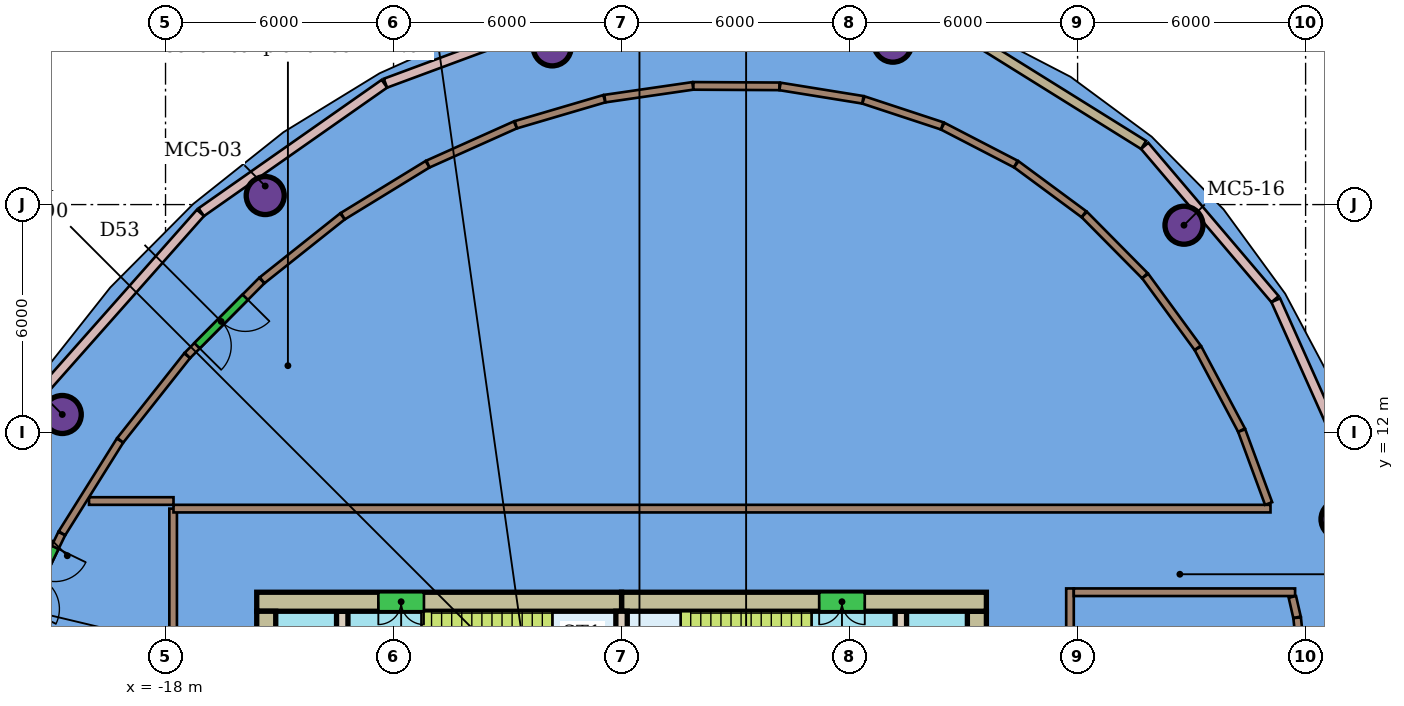
"""IFC4 building model, lengths in metres.
Left out: names, types, materials, properties, quantities, classifications, styles, units other than length and angle.
Written with IfcOpenShell. Run it as: python <this file> out.ifc"""

import sys

from ifc_helpers import new_model, si_unit, direction, frame, frame_2d, origin, origin_2d, place, context, subcontext, project, spatial, rectangle, hollow_circle, extrude, element, fill, save


model = new_model("IFC4")
c1 = context("Model", 3, precision=1e-05, world=origin(), true_north=direction((0.0, 1.0)))
c2 = subcontext(c1, "Body", "Model", "MODEL_VIEW")
j1 = project(units=[si_unit("LENGTHUNIT", "METRE"), si_unit("PLANEANGLEUNIT", "RADIAN")], contexts=[c1])
p1 = place(None, origin())
s1 = spatial("IfcSite", under=j1, at=p1, CompositionType="ELEMENT")
p2 = place(p1, origin())
s2 = spatial("IfcBuilding", under=s1, at=p2, CompositionType="ELEMENT")
p3 = place(p2, frame((0.0, 0.0, 308.7)))
s3 = spatial("IfcBuildingStorey", under=s2, at=p3, CompositionType="ELEMENT", Elevation=308.7)
for number, where, z_axis, x_axis in (
    (1, (1.138, 22.247, 0.0), (0.0, 0.0, 1.0), (1.0, 0.0, 0.0)),
    (2, (-7.825, 22.149, 0.0), (0.0, 0.0, 1.0), (1.0, 0.0, 0.0)),
    (3, (-15.377, 18.238, 0.0), (0.0, 0.0, 1.0), (1.0, 0.0, 0.0)),
    (4, (-20.718, 12.477, 0.0), (0.0, 0.0, 1.0), (1.0, 0.0, 0.0)),
    (5, (12.906, 9.72, 0.0), (0.0, 0.0, 1.0), (1.0, 0.0, 0.0)),
    (6, (8.8, 17.457, 0.0), (0.0, 0.0, 1.0), (1.0, 0.0, 0.0)),
):
    element("IfcColumn", number, at=place(p3, frame(where, z_axis=z_axis, x_axis=x_axis)), inside=s3, PredefinedType="COLUMN", context=c2, shape_type="SweptSolid", body=[
        extrude(hollow_circle(Radius=0.5, WallThickness=0.04, at=origin_2d()), origin(), (0.0, 0.0, 1.0), 4.0),
    ])
p4 = place(p3, frame((-17.8, -7.9, 0.0), z_axis=(0.0, 0.0, 1.0), x_axis=(0.0, 1.0, 0.0)))
e7 = element("IfcWall", 7, at=p4, inside=s3, PredefinedType="PARTITIONING", context=c2, shape_type="SweptSolid", body=[
    extrude(rectangle(XDim=17.9, YDim=0.2, at=frame_2d((8.95, 0.0))), origin(), (0.0, 0.0, 1.0), 3.65),
])
p5 = place(p3, frame((-17.79, 10.0, 0.0), z_axis=(0.0, 0.0, 1.0), x_axis=(1.0, 0.0, 0.0)))
e8 = element("IfcWall", 8, at=p5, inside=s3, PredefinedType="PARTITIONING", context=c2, shape_type="SweptSolid", body=[
    extrude(rectangle(XDim=28.866, YDim=0.2, at=frame_2d((14.433, 0.0))), origin(), (0.0, 0.0, 1.0), 3.65),
])
p6 = place(p3, frame((5.8, -9.9, 0.0), z_axis=(0.0, 0.0, 1.0), x_axis=(0.0, 1.0, 0.0)))
e9 = element("IfcWall", 9, at=p6, inside=s3, PredefinedType="PARTITIONING", context=c2, shape_type="SweptSolid", body=[
    extrude(rectangle(XDim=17.8, YDim=0.2, at=frame_2d((8.9, 0.0))), origin(), (0.0, 0.0, 1.0), 3.65),
])
p7 = place(p6, frame((8.4, 0.0, 0.0)))
e10 = element("IfcOpeningElement", 10, at=p7, cuts=e9, PredefinedType="OPENING", context=c2, shape_type="SweptSolid", body=[
    extrude(rectangle(XDim=1.0, YDim=2.1, at=frame_2d((0.5, 1.05))), frame((0.0, 0.11, 0.0), z_axis=(0.0, -1.0, 0.0), x_axis=(1.0, 0.0, 0.0)), (0.0, 0.0, 1.0), 0.22),
])
p8 = place(p3, frame((5.9, 7.8, 0.0), z_axis=(0.0, 0.0, 1.0), x_axis=(1.0, 0.0, 0.0)))
e11 = element("IfcWall", 11, at=p8, inside=s3, PredefinedType="PARTITIONING", context=c2, shape_type="SweptSolid", body=[
    extrude(rectangle(XDim=5.824, YDim=0.2, at=frame_2d((2.912, 0.0))), origin(), (0.0, 0.0, 1.0), 3.65),
])
p9 = place(p3, frame((-20.013, 10.2, 0.0), z_axis=(0.0, 0.0, 1.0), x_axis=(1.0, 0.0, 0.0)))
e12 = element("IfcWall", 12, at=p9, inside=s3, PredefinedType="PARTITIONING", context=c2, shape_type="SweptSolid", body=[
    extrude(rectangle(XDim=2.223, YDim=0.2, at=frame_2d((1.112, 0.0))), origin(), (0.0, 0.0, 1.0), 3.65),
])
p10 = place(p3, frame((-20.73, 9.343, 0.0), z_axis=(0.0, 0.0, 1.0), x_axis=(-0.436405284506, -0.89975020292, 0.0)))
e13 = element("IfcWall", 13, at=p10, inside=s3, PredefinedType="PARTITIONING", context=c2, shape_type="SweptSolid", body=[
    extrude(rectangle(XDim=2.909, YDim=0.2, at=frame_2d((1.455, 0.0))), origin(), (0.0, 0.0, 1.0), 3.65),
])
p11 = place(p10, frame((0.403, 0.0, 0.0)))
e14 = element("IfcOpeningElement", 14, at=p11, cuts=e13, PredefinedType="OPENING", context=c2, shape_type="SweptSolid", body=[
    extrude(rectangle(XDim=1.8, YDim=2.4, at=frame_2d((0.9, 1.2))), frame((0.0, 0.11, 0.0), z_axis=(0.0, -1.0, 0.0), x_axis=(1.0, 0.0, 0.0)), (0.0, 0.0, 1.0), 0.22),
])
p12 = place(p3, frame((-20.725, 9.352, 0.0), z_axis=(0.0, 0.0, 1.0), x_axis=(0.530761457751, 0.847521253401, 0.0)))
e15 = element("IfcWall", 15, at=p12, inside=s3, PredefinedType="PARTITIONING", context=c2, shape_type="SweptSolid", body=[
    extrude(rectangle(XDim=2.877, YDim=0.2, at=frame_2d((1.438, 0.0))), origin(), (0.0, 0.0, 1.0), 3.65),
])
p13 = place(p3, frame((-19.191, 11.799, 0.0), z_axis=(0.0, 0.0, 1.0), x_axis=(0.620327979869, 0.784342525553, 0.0)))
e16 = element("IfcWall", 16, at=p13, inside=s3, PredefinedType="PARTITIONING", context=c2, shape_type="SweptSolid", body=[
    extrude(rectangle(XDim=2.836, YDim=0.2, at=frame_2d((1.418, 0.0))), origin(), (0.0, 0.0, 1.0), 3.65),
])
p14 = place(p3, frame((-15.468, 16.001, 0.0), z_axis=(0.0, 0.0, 1.0), x_axis=(-0.704683921548, -0.70952136734, 0.0)))
e17 = element("IfcWall", 17, at=p14, inside=s3, PredefinedType="PARTITIONING", context=c2, shape_type="SweptSolid", body=[
    extrude(rectangle(XDim=2.776, YDim=0.2, at=frame_2d((1.388, 0.0))), origin(), (0.0, 0.0, 1.0), 3.65),
])
p15 = place(p14, frame((0.617, 0.0, 0.0)))
e18 = element("IfcOpeningElement", 18, at=p15, cuts=e17, PredefinedType="OPENING", context=c2, shape_type="SweptSolid", body=[
    extrude(rectangle(XDim=1.8, YDim=2.4, at=frame_2d((0.9, 1.2))), frame((0.0, 0.11, 0.0), z_axis=(0.0, -1.0, 0.0), x_axis=(1.0, 0.0, 0.0)), (0.0, 0.0, 1.0), 0.22),
])
p16 = place(p3, frame((-15.458, 16.008, 0.0), z_axis=(0.0, 0.0, 1.0), x_axis=(0.782656107767, 0.62245434931, 0.0)))
e19 = element("IfcWall", 19, at=p16, inside=s3, PredefinedType="PARTITIONING", context=c2, shape_type="SweptSolid", body=[
    extrude(rectangle(XDim=2.7, YDim=0.2, at=frame_2d((1.35, 0.0))), origin(), (0.0, 0.0, 1.0), 3.65),
])
p17 = place(p3, frame((-13.334, 17.696, 0.0), z_axis=(0.0, 0.0, 1.0), x_axis=(0.852667029926, 0.522454721557, 0.0)))
e20 = element("IfcWall", 20, at=p17, inside=s3, PredefinedType="PARTITIONING", context=c2, shape_type="SweptSolid", body=[
    extrude(rectangle(XDim=2.614, YDim=0.2, at=frame_2d((1.307, 0.0))), origin(), (0.0, 0.0, 1.0), 3.65),
])
p18 = place(p3, frame((-11.094, 19.067, 0.0), z_axis=(0.0, 0.0, 1.0), x_axis=(0.912552955942, 0.408958558538, 0.0)))
e21 = element("IfcWall", 21, at=p18, inside=s3, PredefinedType="PARTITIONING", context=c2, shape_type="SweptSolid", body=[
    extrude(rectangle(XDim=2.521, YDim=0.2, at=frame_2d((1.26, 0.0))), origin(), (0.0, 0.0, 1.0), 3.65),
])
p19 = place(p3, frame((-8.781, 20.101, 0.0), z_axis=(0.0, 0.0, 1.0), x_axis=(0.95934146389, 0.28224803925, 0.0)))
e22 = element("IfcWall", 22, at=p19, inside=s3, PredefinedType="PARTITIONING", context=c2, shape_type="SweptSolid", body=[
    extrude(rectangle(XDim=2.426, YDim=0.2, at=frame_2d((1.213, 0.0))), origin(), (0.0, 0.0, 1.0), 3.65),
])
p20 = place(p3, frame((-6.439, 20.788, 0.0), z_axis=(0.0, 0.0, 1.0), x_axis=(0.989671979467, 0.143350525141, 0.0)))
e23 = element("IfcWall", 23, at=p20, inside=s3, PredefinedType="PARTITIONING", context=c2, shape_type="SweptSolid", body=[
    extrude(rectangle(XDim=2.338, YDim=0.2, at=frame_2d((1.169, 0.0))), origin(), (0.0, 0.0, 1.0), 3.65),
])
p21 = place(p3, frame((-4.11, 21.123, 0.0), z_axis=(0.0, 0.0, 1.0), x_axis=(0.999986603133, -0.005176248997, 0.0)))
e24 = element("IfcWall", 24, at=p21, inside=s3, PredefinedType="PARTITIONING", context=c2, shape_type="SweptSolid", body=[
    extrude(rectangle(XDim=2.264, YDim=0.2, at=frame_2d((1.132, 0.0))), origin(), (0.0, 0.0, 1.0), 3.65),
])
p22 = place(p3, frame((-1.831, 21.109, 0.0), z_axis=(0.0, 0.0, 1.0), x_axis=(0.987257926423, -0.159128208423, 0.0)))
e25 = element("IfcWall", 25, at=p22, inside=s3, PredefinedType="PARTITIONING", context=c2, shape_type="SweptSolid", body=[
    extrude(rectangle(XDim=2.209, YDim=0.2, at=frame_2d((1.104, 0.0))), origin(), (0.0, 0.0, 1.0), 3.65),
])
p23 = place(p3, frame((0.365, 20.752, 0.0), z_axis=(0.0, 0.0, 1.0), x_axis=(0.949852302688, -0.312698901627, 0.0)))
e26 = element("IfcWall", 26, at=p23, inside=s3, PredefinedType="PARTITIONING", context=c2, shape_type="SweptSolid", body=[
    extrude(rectangle(XDim=2.181, YDim=0.2, at=frame_2d((1.09, 0.0))), origin(), (0.0, 0.0, 1.0), 3.65),
])
p24 = place(p3, frame((2.451, 20.063, 0.0), z_axis=(0.0, 0.0, 1.0), x_axis=(0.888068415533, -0.45971131086, 0.0)))
e27 = element("IfcWall", 27, at=p24, inside=s3, PredefinedType="PARTITIONING", context=c2, shape_type="SweptSolid", body=[
    extrude(rectangle(XDim=2.165, YDim=0.2, at=frame_2d((1.082, 0.0))), origin(), (0.0, 0.0, 1.0), 3.65),
])
p25 = place(p3, frame((4.387, 19.06, 0.0), z_axis=(0.0, 0.0, 1.0), x_axis=(0.80443326696, -0.594043027909, 0.0)))
e28 = element("IfcWall", 28, at=p25, inside=s3, PredefinedType="PARTITIONING", context=c2, shape_type="SweptSolid", body=[
    extrude(rectangle(XDim=2.209, YDim=0.2, at=frame_2d((1.105, 0.0))), origin(), (0.0, 0.0, 1.0), 3.65),
])
p26 = place(p3, frame((6.177, 17.739, 0.0), z_axis=(0.0, 0.0, 1.0), x_axis=(0.703376280453, -0.710817703843, 0.0)))
e29 = element("IfcWall", 29, at=p26, inside=s3, PredefinedType="PARTITIONING", context=c2, shape_type="SweptSolid", body=[
    extrude(rectangle(XDim=2.264, YDim=0.2, at=frame_2d((1.132, 0.0))), origin(), (0.0, 0.0, 1.0), 3.65),
])
p27 = place(p3, frame((7.78, 16.119, 0.0), z_axis=(0.0, 0.0, 1.0), x_axis=(0.590082027637, -0.807343297897, 0.0)))
e30 = element("IfcWall", 30, at=p27, inside=s3, PredefinedType="PARTITIONING", context=c2, shape_type="SweptSolid", body=[
    extrude(rectangle(XDim=2.338, YDim=0.2, at=frame_2d((1.169, 0.0))), origin(), (0.0, 0.0, 1.0), 3.65),
])
p28 = place(p3, frame((9.168, 14.219, 0.0), z_axis=(0.0, 0.0, 1.0), x_axis=(0.469606334902, -0.882875920059, 0.0)))
e31 = element("IfcWall", 31, at=p28, inside=s3, PredefinedType="PARTITIONING", context=c2, shape_type="SweptSolid", body=[
    extrude(rectangle(XDim=2.44, YDim=0.2, at=frame_2d((1.22, 0.0))), origin(), (0.0, 0.0, 1.0), 3.65),
])
p29 = place(p3, frame((10.319, 12.052, 0.0), z_axis=(0.0, 0.0, 1.0), x_axis=(0.346197844841, -0.938161527791, 0.0)))
e32 = element("IfcWall", 32, at=p29, inside=s3, PredefinedType="PARTITIONING", context=c2, shape_type="SweptSolid", body=[
    extrude(rectangle(XDim=2.044, YDim=0.2, at=frame_2d((1.022, 0.0))), origin(), (0.0, 0.0, 1.0), 3.65),
])
p30 = place(p3, frame((11.652, 7.678, 0.0), z_axis=(0.0, 0.0, 1.0), x_axis=(0.2234024776, -0.974726286196, 0.0)))
e33 = element("IfcWall", 33, at=p30, inside=s3, PredefinedType="PARTITIONING", context=c2, shape_type="SweptSolid", body=[
    extrude(rectangle(XDim=0.551, YDim=0.2, at=frame_2d((0.275, 0.0))), origin(), (0.0, 0.0, 1.0), 3.65),
])
p31 = place(p3, frame((11.777, 7.129, 0.0), z_axis=(0.0, 0.0, 1.0), x_axis=(0.102877560919, -0.994694027055, 0.0)))
e34 = element("IfcWall", 34, at=p31, inside=s3, PredefinedType="PARTITIONING", context=c2, shape_type="SweptSolid", body=[
    extrude(rectangle(XDim=2.701, YDim=0.2, at=frame_2d((1.35, 0.0))), origin(), (0.0, 0.0, 1.0), 3.65),
])
p32 = place(p3, frame((-6.983, 23.131, 0.0), z_axis=(0.0, 0.0, 1.0), x_axis=(-0.937764073403, -0.34727300879, 0.0)))
e35 = element("IfcWall", 35, at=p32, inside=s3, PredefinedType="SOLIDWALL", context=c2, shape_type="SweptSolid", body=[
    extrude(rectangle(XDim=5.577, YDim=0.25, at=frame_2d((2.789, 0.0))), origin(), (0.0, 0.0, 1.0), 3.7),
])
p33 = place(p3, frame((-12.241, 21.18, 0.0), z_axis=(0.0, 0.0, 1.0), x_axis=(-0.818761962214, -0.574133128492, 0.0)))
e36 = element("IfcWall", 36, at=p33, inside=s3, PredefinedType="SOLIDWALL", context=c2, shape_type="SweptSolid", body=[
    extrude(rectangle(XDim=5.885, YDim=0.25, at=frame_2d((2.943, 0.0))), origin(), (0.0, 0.0, 1.0), 3.7),
])
p34 = place(p3, frame((-17.081, 17.781, 0.0), z_axis=(0.0, 0.0, 1.0), x_axis=(-0.663232601491, -0.748413332537, 0.0)))
e37 = element("IfcWall", 37, at=p34, inside=s3, PredefinedType="SOLIDWALL", context=c2, shape_type="SweptSolid", body=[
    extrude(rectangle(XDim=6.139, YDim=0.25, at=frame_2d((3.07, 0.0))), origin(), (0.0, 0.0, 1.0), 3.7),
])
p35 = place(p3, frame((13.49, 10.39, 0.0), z_axis=(0.0, 0.0, 1.0), x_axis=(-0.407989751163, 0.912986507538, 0.0)))
e38 = element("IfcWall", 38, at=p35, inside=s3, PredefinedType="SOLIDWALL", context=c2, shape_type="SweptSolid", body=[
    extrude(rectangle(XDim=5.577, YDim=0.25, at=frame_2d((2.789, 0.0))), origin(), (0.0, 0.0, 1.0), 3.7),
])
p36 = place(p3, frame((11.196, 15.511, 0.0), z_axis=(0.0, 0.0, 1.0), x_axis=(-0.647893308308, 0.761731094973, 0.0)))
e39 = element("IfcWall", 39, at=p36, inside=s3, PredefinedType="SOLIDWALL", context=c2, shape_type="SweptSolid", body=[
    extrude(rectangle(XDim=5.295, YDim=0.25, at=frame_2d((2.647, 0.0))), origin(), (0.0, 0.0, 1.0), 3.7),
])
p37 = place(p3, frame((7.737, 19.57, 0.0), z_axis=(0.0, 0.0, 1.0), x_axis=(-0.84872546146, 0.528833708333, 0.0)))
e40 = element("IfcWall", 40, at=p37, inside=s3, PredefinedType="SOLIDWALL", context=c2, shape_type="SweptSolid", body=[
    extrude(rectangle(XDim=5.125, YDim=0.25, at=frame_2d((2.562, 0.0))), origin(), (0.0, 0.0, 1.0), 4.0),
])
p38 = place(p3, frame((3.6, 7.55, 0.0), z_axis=(0.0, 0.0, 1.0), x_axis=(-1.0, 0.0, 0.0)))
e41 = element("IfcWall", 41, at=p38, inside=s3, PredefinedType="SHEAR", context=c2, shape_type="SweptSolid", body=[
    extrude(rectangle(XDim=9.6, YDim=0.5, at=frame_2d((4.8, 0.0))), origin(), (0.0, 0.0, 1.0), 3.9),
])
p39 = place(p38, frame((3.2, 0.0, 0.0)))
e42 = element("IfcOpeningElement", 42, at=p39, cuts=e41, PredefinedType="OPENING", context=c2, shape_type="SweptSolid", body=[
    extrude(rectangle(XDim=1.2, YDim=2.1, at=frame_2d((0.6, 1.05))), frame((0.0, 0.26, 0.0), z_axis=(0.0, -1.0, 0.0), x_axis=(1.0, 0.0, 0.0)), (0.0, 0.0, 1.0), 0.52),
])
p40 = place(p3, frame((-6.0, 7.55, 0.0), z_axis=(0.0, 0.0, 1.0), x_axis=(-1.0, 0.0, 0.0)))
e43 = element("IfcWall", 43, at=p40, inside=s3, PredefinedType="SHEAR", context=c2, shape_type="SweptSolid", body=[
    extrude(rectangle(XDim=9.6, YDim=0.5, at=frame_2d((4.8, 0.0))), origin(), (0.0, 0.0, 1.0), 3.9),
])
p41 = place(p40, frame((5.2, 0.0, 0.0)))
e44 = element("IfcOpeningElement", 44, at=p41, cuts=e43, PredefinedType="OPENING", context=c2, shape_type="SweptSolid", body=[
    extrude(rectangle(XDim=1.2, YDim=2.1, at=frame_2d((0.6, 1.05))), frame((0.0, 0.26, 0.0), z_axis=(0.0, -1.0, 0.0), x_axis=(1.0, 0.0, 0.0)), (0.0, 0.0, 1.0), 0.52),
])
p42 = place(p3, frame((-15.35, 7.3, 0.0), z_axis=(0.0, 0.0, 1.0), x_axis=(0.0, -1.0, 0.0)))
e45 = element("IfcWall", 45, at=p42, inside=s3, PredefinedType="SHEAR", context=c2, shape_type="SweptSolid", body=[
    extrude(rectangle(XDim=14.6, YDim=0.5, at=frame_2d((7.3, 0.0))), origin(), (0.0, 0.0, 1.0), 3.9),
])
p43 = place(p42, frame((10.6, 0.0, 0.0)))
e46 = element("IfcOpeningElement", 46, at=p43, cuts=e45, PredefinedType="OPENING", context=c2, shape_type="SweptSolid", body=[
    extrude(rectangle(XDim=1.2, YDim=2.1, at=frame_2d((0.6, 1.05))), frame((0.0, 0.26, 0.0), z_axis=(0.0, -1.0, 0.0), x_axis=(1.0, 0.0, 0.0)), (0.0, 0.0, 1.0), 0.52),
])
p44 = place(p42, frame((2.8, 0.0, 0.0)))
e47 = element("IfcOpeningElement", 47, at=p44, cuts=e45, PredefinedType="OPENING", context=c2, shape_type="SweptSolid", body=[
    extrude(rectangle(XDim=1.2, YDim=2.1, at=frame_2d((0.6, 1.05))), frame((0.0, 0.26, 0.0), z_axis=(0.0, -1.0, 0.0), x_axis=(1.0, 0.0, 0.0)), (0.0, 0.0, 1.0), 0.52),
])
p45 = place(p3, frame((3.35, -7.3, 0.0), z_axis=(0.0, 0.0, 1.0), x_axis=(0.0, 1.0, 0.0)))
e48 = element("IfcWall", 48, at=p45, inside=s3, PredefinedType="SHEAR", context=c2, shape_type="SweptSolid", body=[
    extrude(rectangle(XDim=14.6, YDim=0.5, at=frame_2d((7.3, 0.0))), origin(), (0.0, 0.0, 1.0), 3.9),
])
p46 = place(p45, frame((2.8, 0.0, 0.0)))
e49 = element("IfcOpeningElement", 49, at=p46, cuts=e48, PredefinedType="OPENING", context=c2, shape_type="SweptSolid", body=[
    extrude(rectangle(XDim=1.2, YDim=2.1, at=frame_2d((0.6, 1.05))), frame((0.0, 0.26, 0.0), z_axis=(0.0, -1.0, 0.0), x_axis=(1.0, 0.0, 0.0)), (0.0, 0.0, 1.0), 0.52),
])
p47 = place(p45, frame((10.6, 0.0, 0.0)))
e50 = element("IfcOpeningElement", 50, at=p47, cuts=e48, PredefinedType="OPENING", context=c2, shape_type="SweptSolid", body=[
    extrude(rectangle(XDim=1.2, YDim=2.1, at=frame_2d((0.6, 1.05))), frame((0.0, 0.26, 0.0), z_axis=(0.0, -1.0, 0.0), x_axis=(1.0, 0.0, 0.0)), (0.0, 0.0, 1.0), 0.52),
])
p48 = place(p3, frame((-13.35, 7.3, 0.0), z_axis=(0.0, 0.0, 1.0), x_axis=(0.0, -1.0, 0.0)))
e51 = element("IfcWall", 51, at=p48, inside=s3, PredefinedType="SHEAR", context=c2, shape_type="SweptSolid", body=[
    extrude(rectangle(XDim=14.6, YDim=0.3, at=frame_2d((7.3, 0.0))), origin(), (0.0, 0.0, 1.0), 3.9),
])
p49 = place(p48, frame((6.55, 0.0, 0.0)))
e52 = element("IfcOpeningElement", 52, at=p49, cuts=e51, PredefinedType="OPENING", context=c2, shape_type="SweptSolid", body=[
    extrude(rectangle(XDim=1.5, YDim=2.1, at=frame_2d((0.75, 1.05))), frame((0.0, 0.16, 0.0), z_axis=(0.0, -1.0, 0.0), x_axis=(1.0, 0.0, 0.0)), (0.0, 0.0, 1.0), 0.32),
])
p50 = place(p3, frame((1.35, -7.3, 0.0), z_axis=(0.0, 0.0, 1.0), x_axis=(0.0, 1.0, 0.0)))
e53 = element("IfcWall", 53, at=p50, inside=s3, PredefinedType="SHEAR", context=c2, shape_type="SweptSolid", body=[
    extrude(rectangle(XDim=14.6, YDim=0.3, at=frame_2d((7.3, 0.0))), origin(), (0.0, 0.0, 1.0), 3.9),
])
p51 = place(p50, frame((1.21, 0.0, 0.0)))
e54 = element("IfcOpeningElement", 54, at=p51, cuts=e53, PredefinedType="OPENING", context=c2, shape_type="SweptSolid", body=[
    extrude(rectangle(XDim=1.0, YDim=2.1, at=frame_2d((0.5, 1.05))), frame((0.0, 0.16, 0.0), z_axis=(0.0, -1.0, 0.0), x_axis=(1.0, 0.0, 0.0)), (0.0, 0.0, 1.0), 0.32),
])
p52 = place(p50, frame((6.55, 0.0, 0.0)))
e55 = element("IfcOpeningElement", 55, at=p52, cuts=e53, PredefinedType="OPENING", context=c2, shape_type="SweptSolid", body=[
    extrude(rectangle(XDim=1.5, YDim=2.1, at=frame_2d((0.75, 1.05))), frame((0.0, 0.16, 0.0), z_axis=(0.0, -1.0, 0.0), x_axis=(1.0, 0.0, 0.0)), (0.0, 0.0, 1.0), 0.32),
])
p53 = place(p3, frame((-6.0, 3.88, 0.0), z_axis=(0.0, 0.0, 1.0), x_axis=(0.0, 1.0, 0.0)))
e56 = element("IfcWall", 56, at=p53, inside=s3, PredefinedType="SHEAR", context=c2, shape_type="SweptSolid", body=[
    extrude(rectangle(XDim=3.42, YDim=0.3, at=frame_2d((1.71, 0.0))), origin(), (0.0, 0.0, 1.0), 3.9),
])
p54 = place(p11, origin())
e57 = element("IfcDoor", 57, at=p54, inside=s3, OperationType="DOUBLE_DOOR_SINGLE_SWING", PredefinedType="DOOR", context=c2, shape_type="SweptSolid", body=[
    extrude(rectangle(XDim=1.8, YDim=2.4, at=frame_2d((0.9, 1.2))), frame((0.0, 0.025, 0.0), z_axis=(0.0, -1.0, 0.0), x_axis=(1.0, 0.0, 0.0)), (0.0, 0.0, 1.0), 0.05),
])
fill(e14, e57)
p55 = place(p15, origin())
e58 = element("IfcDoor", 58, at=p55, inside=s3, OperationType="DOUBLE_DOOR_SINGLE_SWING", PredefinedType="DOOR", context=c2, shape_type="SweptSolid", body=[
    extrude(rectangle(XDim=1.8, YDim=2.4, at=frame_2d((0.9, 1.2))), frame((0.0, 0.025, 0.0), z_axis=(0.0, -1.0, 0.0), x_axis=(1.0, 0.0, 0.0)), (0.0, 0.0, 1.0), 0.05),
])
fill(e18, e58)
p56 = place(p39, origin())
e59 = element("IfcDoor", 59, at=p56, inside=s3, OperationType="DOUBLE_DOOR_SINGLE_SWING", PredefinedType="NOTDEFINED", context=c2, shape_type="SweptSolid", body=[
    extrude(rectangle(XDim=1.2, YDim=2.1, at=frame_2d((0.6, 1.05))), frame((0.0, 0.025, 0.0), z_axis=(0.0, -1.0, 0.0), x_axis=(1.0, 0.0, 0.0)), (0.0, 0.0, 1.0), 0.05),
])
fill(e42, e59)
p57 = place(p41, origin())
e60 = element("IfcDoor", 60, at=p57, inside=s3, OperationType="DOUBLE_DOOR_SINGLE_SWING", PredefinedType="NOTDEFINED", context=c2, shape_type="SweptSolid", body=[
    extrude(rectangle(XDim=1.2, YDim=2.1, at=frame_2d((0.6, 1.05))), frame((0.0, 0.025, 0.0), z_axis=(0.0, -1.0, 0.0), x_axis=(1.0, 0.0, 0.0)), (0.0, 0.0, 1.0), 0.05),
])
fill(e44, e60)
save(model, sys.argv[1])
